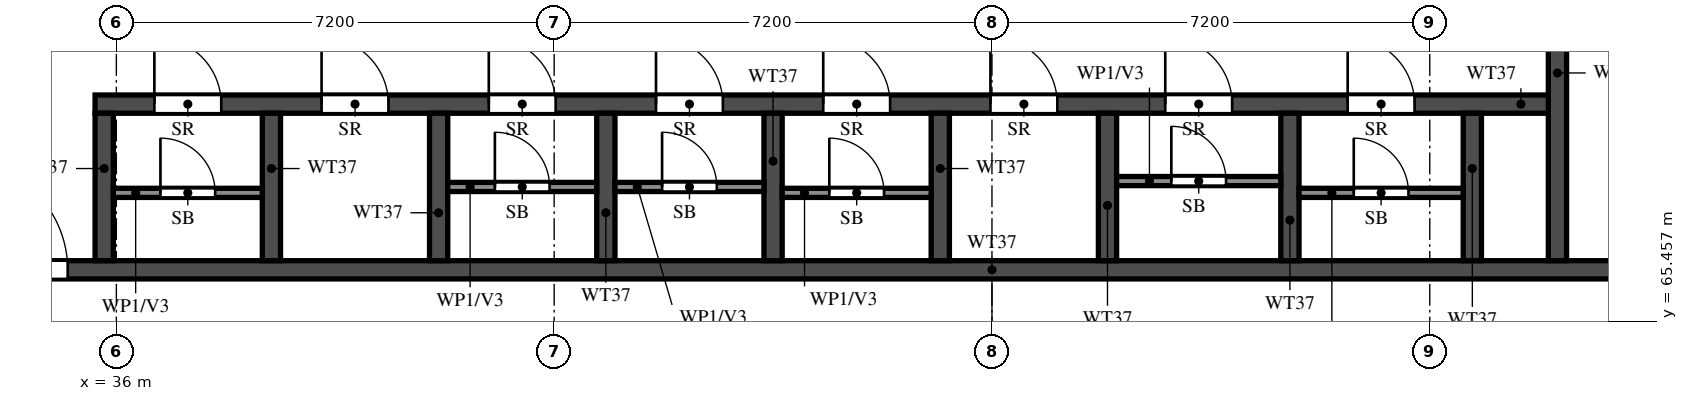
"""IFC4 building model, lengths in metres.
Left out: names, types, materials, properties, quantities, classifications, styles, units other than length and angle.
Written with IfcOpenShell. Run it as: python <this file> out.ifc"""

import sys

from ifc_helpers import new_model, si_unit, direction, frame, frame_2d, origin, place, context, subcontext, project, spatial, rectangle, extrude, element, fill, save


model = new_model("IFC4")
c1 = context("Model", 3, precision=1e-05, world=origin(), true_north=direction((0.0, 1.0)))
c2 = subcontext(c1, "Body", "Model", "MODEL_VIEW")
j1 = project(units=[si_unit("LENGTHUNIT", "METRE"), si_unit("PLANEANGLEUNIT", "RADIAN")], contexts=[c1])
p1 = place(None, origin())
s1 = spatial("IfcSite", under=j1, at=p1, CompositionType="ELEMENT")
p2 = place(p1, origin())
s2 = spatial("IfcBuilding", under=s1, at=p2, CompositionType="ELEMENT")
p3 = place(p2, frame((0.0, 0.0, 222.0)))
s3 = spatial("IfcBuildingStorey", under=s2, at=p3, CompositionType="ELEMENT", Elevation=222.0)
p4 = place(p3, frame((29.2, 66.3, 0.0), z_axis=(0.0, 0.0, 1.0), x_axis=(1.0, 0.0, 0.0)))
e1 = element("IfcWall", 1, at=p4, inside=s3, PredefinedType="SHEAR", context=c2, shape_type="SweptSolid", body=[
    extrude(rectangle(XDim=42.4, YDim=0.3, at=frame_2d((21.2, 0.0))), origin(), (0.0, 0.0, 1.0), 3.22),
])
p5 = place(p4, frame((1.425, 0.0, 0.0)))
e2 = element("IfcOpeningElement", 2, at=p5, cuts=e1, PredefinedType="OPENING", context=c2, shape_type="SweptSolid", body=[
    extrude(rectangle(XDim=1.1, YDim=2.1, at=frame_2d((0.55, 1.05))), frame((0.0, 0.16, 0.0), z_axis=(0.0, -1.0, 0.0), x_axis=(1.0, 0.0, 0.0)), (0.0, 0.0, 1.0), 0.32),
])
p6 = place(p4, frame((4.2, 0.0, 0.0)))
e3 = element("IfcOpeningElement", 3, at=p6, cuts=e1, PredefinedType="OPENING", context=c2, shape_type="SweptSolid", body=[
    extrude(rectangle(XDim=1.8, YDim=2.1, at=frame_2d((0.9, 1.05))), frame((0.0, 0.16, 0.0), z_axis=(0.0, -1.0, 0.0), x_axis=(1.0, 0.0, 0.0)), (0.0, 0.0, 1.0), 0.32),
])
p7 = place(p3, frame((35.65, 69.025, 0.0), z_axis=(0.0, 0.0, 1.0), x_axis=(1.0, 0.0, 0.0)))
e4 = element("IfcWall", 4, at=p7, inside=s3, PredefinedType="SHEAR", context=c2, shape_type="SweptSolid", body=[
    extrude(rectangle(XDim=24.05, YDim=0.3, at=frame_2d((12.025, 0.0))), origin(), (0.0, 0.0, 1.0), 3.22),
])
p8 = place(p7, frame((0.975, 0.0, 0.0)))
e5 = element("IfcOpeningElement", 5, at=p8, cuts=e4, PredefinedType="OPENING", context=c2, shape_type="SweptSolid", body=[
    extrude(rectangle(XDim=1.1, YDim=2.1, at=frame_2d((0.55, 1.05))), frame((0.0, 0.16, 0.0), z_axis=(0.0, -1.0, 0.0), x_axis=(1.0, 0.0, 0.0)), (0.0, 0.0, 1.0), 0.32),
])
p9 = place(p7, frame((3.725, 0.0, 0.0)))
e6 = element("IfcOpeningElement", 6, at=p9, cuts=e4, PredefinedType="OPENING", context=c2, shape_type="SweptSolid", body=[
    extrude(rectangle(XDim=1.1, YDim=2.1, at=frame_2d((0.55, 1.05))), frame((0.0, 0.16, 0.0), z_axis=(0.0, -1.0, 0.0), x_axis=(1.0, 0.0, 0.0)), (0.0, 0.0, 1.0), 0.32),
])
p10 = place(p7, frame((6.475, 0.0, 0.0)))
e7 = element("IfcOpeningElement", 7, at=p10, cuts=e4, PredefinedType="OPENING", context=c2, shape_type="SweptSolid", body=[
    extrude(rectangle(XDim=1.1, YDim=2.1, at=frame_2d((0.55, 1.05))), frame((0.0, 0.16, 0.0), z_axis=(0.0, -1.0, 0.0), x_axis=(1.0, 0.0, 0.0)), (0.0, 0.0, 1.0), 0.32),
])
p11 = place(p7, frame((9.225, 0.0, 0.0)))
e8 = element("IfcOpeningElement", 8, at=p11, cuts=e4, PredefinedType="OPENING", context=c2, shape_type="SweptSolid", body=[
    extrude(rectangle(XDim=1.1, YDim=2.1, at=frame_2d((0.55, 1.05))), frame((0.0, 0.16, 0.0), z_axis=(0.0, -1.0, 0.0), x_axis=(1.0, 0.0, 0.0)), (0.0, 0.0, 1.0), 0.32),
])
p12 = place(p7, frame((11.975, 0.0, 0.0)))
e9 = element("IfcOpeningElement", 9, at=p12, cuts=e4, PredefinedType="OPENING", context=c2, shape_type="SweptSolid", body=[
    extrude(rectangle(XDim=1.1, YDim=2.1, at=frame_2d((0.55, 1.05))), frame((0.0, 0.16, 0.0), z_axis=(0.0, -1.0, 0.0), x_axis=(1.0, 0.0, 0.0)), (0.0, 0.0, 1.0), 0.32),
])
p13 = place(p7, frame((14.725, 0.0, 0.0)))
e10 = element("IfcOpeningElement", 10, at=p13, cuts=e4, PredefinedType="OPENING", context=c2, shape_type="SweptSolid", body=[
    extrude(rectangle(XDim=1.1, YDim=2.1, at=frame_2d((0.55, 1.05))), frame((0.0, 0.16, 0.0), z_axis=(0.0, -1.0, 0.0), x_axis=(1.0, 0.0, 0.0)), (0.0, 0.0, 1.0), 0.32),
])
p14 = place(p7, frame((17.6, 0.0, 0.0)))
e11 = element("IfcOpeningElement", 11, at=p14, cuts=e4, PredefinedType="OPENING", context=c2, shape_type="SweptSolid", body=[
    extrude(rectangle(XDim=1.1, YDim=2.1, at=frame_2d((0.55, 1.05))), frame((0.0, 0.16, 0.0), z_axis=(0.0, -1.0, 0.0), x_axis=(1.0, 0.0, 0.0)), (0.0, 0.0, 1.0), 0.32),
])
p15 = place(p7, frame((20.6, 0.0, 0.0)))
e12 = element("IfcOpeningElement", 12, at=p15, cuts=e4, PredefinedType="OPENING", context=c2, shape_type="SweptSolid", body=[
    extrude(rectangle(XDim=1.1, YDim=2.1, at=frame_2d((0.55, 1.05))), frame((0.0, 0.16, 0.0), z_axis=(0.0, -1.0, 0.0), x_axis=(1.0, 0.0, 0.0)), (0.0, 0.0, 1.0), 0.32),
])
p16 = place(p3, frame((59.7, 66.45, 0.0), z_axis=(0.0, 0.0, 1.0), x_axis=(0.0, 1.0, 0.0)))
e13 = element("IfcWall", 13, at=p16, inside=s3, PredefinedType="SHEAR", context=c2, shape_type="SweptSolid", body=[
    extrude(rectangle(XDim=6.175, YDim=0.3, at=frame_2d((3.087, 0.0))), origin(), (0.0, 0.0, 1.0), 3.22),
])
p17 = place(p16, frame((3.85, 0.0, 0.0)))
e14 = element("IfcOpeningElement", 14, at=p17, cuts=e13, PredefinedType="OPENING", context=c2, shape_type="SweptSolid", body=[
    extrude(rectangle(XDim=1.2, YDim=2.1, at=frame_2d((0.6, 1.05))), frame((0.0, 0.16, 0.0), z_axis=(0.0, -1.0, 0.0), x_axis=(1.0, 0.0, 0.0)), (0.0, 0.0, 1.0), 0.32),
])
for number, where, z_axis, x_axis in (
    (15, (35.8, 66.45, 0.0), (0.0, 0.0, 1.0), (0.0, 1.0, 0.0)),
    (16, (38.55, 66.45, 0.0), (0.0, 0.0, 1.0), (0.0, 1.0, 0.0)),
    (17, (41.3, 66.45, 0.0), (0.0, 0.0, 1.0), (0.0, 1.0, 0.0)),
    (18, (44.05, 66.45, 0.0), (0.0, 0.0, 1.0), (0.0, 1.0, 0.0)),
    (19, (46.8, 66.45, 0.0), (0.0, 0.0, 1.0), (0.0, 1.0, 0.0)),
    (20, (49.55, 66.45, 0.0), (0.0, 0.0, 1.0), (0.0, 1.0, 0.0)),
    (21, (52.3, 66.45, 0.0), (0.0, 0.0, 1.0), (0.0, 1.0, 0.0)),
    (22, (55.3, 66.45, 0.0), (0.0, 0.0, 1.0), (0.0, 1.0, 0.0)),
    (23, (58.3, 66.45, 0.0), (0.0, 0.0, 1.0), (0.0, 1.0, 0.0)),
):
    element("IfcWall", number, at=place(p3, frame(where, z_axis=z_axis, x_axis=x_axis)), inside=s3, PredefinedType="SHEAR", context=c2, shape_type="SweptSolid", body=[
        extrude(rectangle(XDim=2.425, YDim=0.3, at=frame_2d((1.212, 0.0))), origin(), (0.0, 0.0, 1.0), 3.22),
    ])
p18 = place(p3, frame((35.95, 67.565, 0.0), z_axis=(0.0, 0.0, 1.0), x_axis=(1.0, 0.0, 0.0)))
e24 = element("IfcWall", 24, at=p18, inside=s3, PredefinedType="PARTITIONING", context=c2, shape_type="SweptSolid", body=[
    extrude(rectangle(XDim=2.45, YDim=0.15, at=frame_2d((1.225, 0.0))), origin(), (0.0, 0.0, 1.0), 3.22),
])
p19 = place(p18, frame((0.775, 0.0, 0.0)))
e25 = element("IfcOpeningElement", 25, at=p19, cuts=e24, PredefinedType="OPENING", context=c2, shape_type="SweptSolid", body=[
    extrude(rectangle(XDim=0.9, YDim=2.1, at=frame_2d((0.45, 1.05))), frame((0.0, 0.085, 0.0), z_axis=(0.0, -1.0, 0.0), x_axis=(1.0, 0.0, 0.0)), (0.0, 0.0, 1.0), 0.17),
])
p20 = place(p3, frame((41.45, 67.663, 0.0), z_axis=(0.0, 0.0, 1.0), x_axis=(1.0, 0.0, 0.0)))
e26 = element("IfcWall", 26, at=p20, inside=s3, PredefinedType="PARTITIONING", context=c2, shape_type="SweptSolid", body=[
    extrude(rectangle(XDim=2.45, YDim=0.15, at=frame_2d((1.225, 0.0))), origin(), (0.0, 0.0, 1.0), 3.22),
])
p21 = place(p20, frame((0.775, 0.0, 0.0)))
e27 = element("IfcOpeningElement", 27, at=p21, cuts=e26, PredefinedType="OPENING", context=c2, shape_type="SweptSolid", body=[
    extrude(rectangle(XDim=0.9, YDim=2.1, at=frame_2d((0.45, 1.05))), frame((0.0, 0.085, 0.0), z_axis=(0.0, -1.0, 0.0), x_axis=(1.0, 0.0, 0.0)), (0.0, 0.0, 1.0), 0.17),
])
p22 = place(p3, frame((44.2, 67.663, 0.0), z_axis=(0.0, 0.0, 1.0), x_axis=(1.0, 0.0, 0.0)))
e28 = element("IfcWall", 28, at=p22, inside=s3, PredefinedType="PARTITIONING", context=c2, shape_type="SweptSolid", body=[
    extrude(rectangle(XDim=2.45, YDim=0.15, at=frame_2d((1.225, 0.0))), origin(), (0.0, 0.0, 1.0), 3.22),
])
p23 = place(p22, frame((0.775, 0.0, 0.0)))
e29 = element("IfcOpeningElement", 29, at=p23, cuts=e28, PredefinedType="OPENING", context=c2, shape_type="SweptSolid", body=[
    extrude(rectangle(XDim=0.9, YDim=2.1, at=frame_2d((0.45, 1.05))), frame((0.0, 0.085, 0.0), z_axis=(0.0, -1.0, 0.0), x_axis=(1.0, 0.0, 0.0)), (0.0, 0.0, 1.0), 0.17),
])
p24 = place(p3, frame((46.95, 67.565, 0.0), z_axis=(0.0, 0.0, 1.0), x_axis=(1.0, 0.0, 0.0)))
e30 = element("IfcWall", 30, at=p24, inside=s3, PredefinedType="PARTITIONING", context=c2, shape_type="SweptSolid", body=[
    extrude(rectangle(XDim=2.45, YDim=0.15, at=frame_2d((1.225, 0.0))), origin(), (0.0, 0.0, 1.0), 3.22),
])
p25 = place(p24, frame((0.775, 0.0, 0.0)))
e31 = element("IfcOpeningElement", 31, at=p25, cuts=e30, PredefinedType="OPENING", context=c2, shape_type="SweptSolid", body=[
    extrude(rectangle(XDim=0.9, YDim=2.1, at=frame_2d((0.45, 1.05))), frame((0.0, 0.085, 0.0), z_axis=(0.0, -1.0, 0.0), x_axis=(1.0, 0.0, 0.0)), (0.0, 0.0, 1.0), 0.17),
])
p26 = place(p3, frame((52.45, 67.76, 0.0), z_axis=(0.0, 0.0, 1.0), x_axis=(1.0, 0.0, 0.0)))
e32 = element("IfcWall", 32, at=p26, inside=s3, PredefinedType="PARTITIONING", context=c2, shape_type="SweptSolid", body=[
    extrude(rectangle(XDim=2.7, YDim=0.15, at=frame_2d((1.35, 0.0))), origin(), (0.0, 0.0, 1.0), 3.22),
])
p27 = place(p26, frame((0.9, 0.0, 0.0)))
e33 = element("IfcOpeningElement", 33, at=p27, cuts=e32, PredefinedType="OPENING", context=c2, shape_type="SweptSolid", body=[
    extrude(rectangle(XDim=0.9, YDim=2.1, at=frame_2d((0.45, 1.05))), frame((0.0, 0.085, 0.0), z_axis=(0.0, -1.0, 0.0), x_axis=(1.0, 0.0, 0.0)), (0.0, 0.0, 1.0), 0.17),
])
p28 = place(p3, frame((55.45, 67.565, 0.0), z_axis=(0.0, 0.0, 1.0), x_axis=(1.0, 0.0, 0.0)))
e34 = element("IfcWall", 34, at=p28, inside=s3, PredefinedType="PARTITIONING", context=c2, shape_type="SweptSolid", body=[
    extrude(rectangle(XDim=2.7, YDim=0.15, at=frame_2d((1.35, 0.0))), origin(), (0.0, 0.0, 1.0), 3.22),
])
p29 = place(p28, frame((0.9, 0.0, 0.0)))
e35 = element("IfcOpeningElement", 35, at=p29, cuts=e34, PredefinedType="OPENING", context=c2, shape_type="SweptSolid", body=[
    extrude(rectangle(XDim=0.9, YDim=2.1, at=frame_2d((0.45, 1.05))), frame((0.0, 0.085, 0.0), z_axis=(0.0, -1.0, 0.0), x_axis=(1.0, 0.0, 0.0)), (0.0, 0.0, 1.0), 0.17),
])
p30 = place(p6, origin())
e36 = element("IfcDoor", 36, at=p30, inside=s3, OperationType="DOUBLE_DOOR_SINGLE_SWING", PredefinedType="DOOR", context=c2, shape_type="SweptSolid", body=[
    extrude(rectangle(XDim=1.8, YDim=2.1, at=frame_2d((0.9, 1.05))), frame((0.0, 0.025, 0.0), z_axis=(0.0, -1.0, 0.0), x_axis=(1.0, 0.0, 0.0)), (0.0, 0.0, 1.0), 0.05),
])
fill(e3, e36)
p31 = place(p8, origin())
e37 = element("IfcDoor", 37, at=p31, inside=s3, OperationType="SINGLE_SWING_RIGHT", PredefinedType="DOOR", context=c2, shape_type="SweptSolid", body=[
    extrude(rectangle(XDim=1.1, YDim=2.1, at=frame_2d((0.55, 1.05))), frame((0.0, 0.025, 0.0), z_axis=(0.0, -1.0, 0.0), x_axis=(1.0, 0.0, 0.0)), (0.0, 0.0, 1.0), 0.05),
])
fill(e5, e37)
p32 = place(p19, origin())
e38 = element("IfcDoor", 38, at=p32, inside=s3, OperationType="SINGLE_SWING_RIGHT", PredefinedType="DOOR", context=c2, shape_type="SweptSolid", body=[
    extrude(rectangle(XDim=0.9, YDim=2.1, at=frame_2d((0.45, 1.05))), frame((0.0, 0.025, 0.0), z_axis=(0.0, -1.0, 0.0), x_axis=(1.0, 0.0, 0.0)), (0.0, 0.0, 1.0), 0.05),
])
fill(e25, e38)
p33 = place(p9, origin())
e39 = element("IfcDoor", 39, at=p33, inside=s3, OperationType="SINGLE_SWING_LEFT", PredefinedType="DOOR", context=c2, shape_type="SweptSolid", body=[
    extrude(rectangle(XDim=1.1, YDim=2.1, at=frame_2d((0.55, 1.05))), frame((0.0, 0.025, 0.0), z_axis=(0.0, -1.0, 0.0), x_axis=(1.0, 0.0, 0.0)), (0.0, 0.0, 1.0), 0.05),
])
fill(e6, e39)
p34 = place(p10, origin())
e40 = element("IfcDoor", 40, at=p34, inside=s3, OperationType="SINGLE_SWING_RIGHT", PredefinedType="DOOR", context=c2, shape_type="SweptSolid", body=[
    extrude(rectangle(XDim=1.1, YDim=2.1, at=frame_2d((0.55, 1.05))), frame((0.0, 0.025, 0.0), z_axis=(0.0, -1.0, 0.0), x_axis=(1.0, 0.0, 0.0)), (0.0, 0.0, 1.0), 0.05),
])
fill(e7, e40)
p35 = place(p21, origin())
e41 = element("IfcDoor", 41, at=p35, inside=s3, OperationType="SINGLE_SWING_RIGHT", PredefinedType="DOOR", context=c2, shape_type="SweptSolid", body=[
    extrude(rectangle(XDim=0.9, YDim=2.1, at=frame_2d((0.45, 1.05))), frame((0.0, 0.025, 0.0), z_axis=(0.0, -1.0, 0.0), x_axis=(1.0, 0.0, 0.0)), (0.0, 0.0, 1.0), 0.05),
])
fill(e27, e41)
p36 = place(p11, origin())
e42 = element("IfcDoor", 42, at=p36, inside=s3, OperationType="SINGLE_SWING_LEFT", PredefinedType="DOOR", context=c2, shape_type="SweptSolid", body=[
    extrude(rectangle(XDim=1.1, YDim=2.1, at=frame_2d((0.55, 1.05))), frame((0.0, 0.025, 0.0), z_axis=(0.0, -1.0, 0.0), x_axis=(1.0, 0.0, 0.0)), (0.0, 0.0, 1.0), 0.05),
])
fill(e8, e42)
p37 = place(p23, origin())
e43 = element("IfcDoor", 43, at=p37, inside=s3, OperationType="SINGLE_SWING_LEFT", PredefinedType="DOOR", context=c2, shape_type="SweptSolid", body=[
    extrude(rectangle(XDim=0.9, YDim=2.1, at=frame_2d((0.45, 1.05))), frame((0.0, 0.025, 0.0), z_axis=(0.0, -1.0, 0.0), x_axis=(1.0, 0.0, 0.0)), (0.0, 0.0, 1.0), 0.05),
])
fill(e29, e43)
p38 = place(p12, origin())
e44 = element("IfcDoor", 44, at=p38, inside=s3, OperationType="SINGLE_SWING_RIGHT", PredefinedType="DOOR", context=c2, shape_type="SweptSolid", body=[
    extrude(rectangle(XDim=1.1, YDim=2.1, at=frame_2d((0.55, 1.05))), frame((0.0, 0.025, 0.0), z_axis=(0.0, -1.0, 0.0), x_axis=(1.0, 0.0, 0.0)), (0.0, 0.0, 1.0), 0.05),
])
fill(e9, e44)
p39 = place(p25, origin())
e45 = element("IfcDoor", 45, at=p39, inside=s3, OperationType="SINGLE_SWING_RIGHT", PredefinedType="DOOR", context=c2, shape_type="SweptSolid", body=[
    extrude(rectangle(XDim=0.9, YDim=2.1, at=frame_2d((0.45, 1.05))), frame((0.0, 0.025, 0.0), z_axis=(0.0, -1.0, 0.0), x_axis=(1.0, 0.0, 0.0)), (0.0, 0.0, 1.0), 0.05),
])
fill(e31, e45)
p40 = place(p13, origin())
e46 = element("IfcDoor", 46, at=p40, inside=s3, OperationType="SINGLE_SWING_LEFT", PredefinedType="DOOR", context=c2, shape_type="SweptSolid", body=[
    extrude(rectangle(XDim=1.1, YDim=2.1, at=frame_2d((0.55, 1.05))), frame((0.0, 0.025, 0.0), z_axis=(0.0, -1.0, 0.0), x_axis=(1.0, 0.0, 0.0)), (0.0, 0.0, 1.0), 0.05),
])
fill(e10, e46)
p41 = place(p14, origin())
e47 = element("IfcDoor", 47, at=p41, inside=s3, OperationType="SINGLE_SWING_RIGHT", PredefinedType="DOOR", context=c2, shape_type="SweptSolid", body=[
    extrude(rectangle(XDim=1.1, YDim=2.1, at=frame_2d((0.55, 1.05))), frame((0.0, 0.025, 0.0), z_axis=(0.0, -1.0, 0.0), x_axis=(1.0, 0.0, 0.0)), (0.0, 0.0, 1.0), 0.05),
])
fill(e11, e47)
p42 = place(p27, origin())
e48 = element("IfcDoor", 48, at=p42, inside=s3, OperationType="SINGLE_SWING_LEFT", PredefinedType="DOOR", context=c2, shape_type="SweptSolid", body=[
    extrude(rectangle(XDim=0.9, YDim=2.1, at=frame_2d((0.45, 1.05))), frame((0.0, 0.025, 0.0), z_axis=(0.0, -1.0, 0.0), x_axis=(1.0, 0.0, 0.0)), (0.0, 0.0, 1.0), 0.05),
])
fill(e33, e48)
p43 = place(p15, origin())
e49 = element("IfcDoor", 49, at=p43, inside=s3, OperationType="SINGLE_SWING_RIGHT", PredefinedType="DOOR", context=c2, shape_type="SweptSolid", body=[
    extrude(rectangle(XDim=1.1, YDim=2.1, at=frame_2d((0.55, 1.05))), frame((0.0, 0.025, 0.0), z_axis=(0.0, -1.0, 0.0), x_axis=(1.0, 0.0, 0.0)), (0.0, 0.0, 1.0), 0.05),
])
fill(e12, e49)
p44 = place(p29, origin())
e50 = element("IfcDoor", 50, at=p44, inside=s3, OperationType="SINGLE_SWING_RIGHT", PredefinedType="DOOR", context=c2, shape_type="SweptSolid", body=[
    extrude(rectangle(XDim=0.9, YDim=2.1, at=frame_2d((0.45, 1.05))), frame((0.0, 0.025, 0.0), z_axis=(0.0, -1.0, 0.0), x_axis=(1.0, 0.0, 0.0)), (0.0, 0.0, 1.0), 0.05),
])
fill(e35, e50)
save(model, sys.argv[1])
